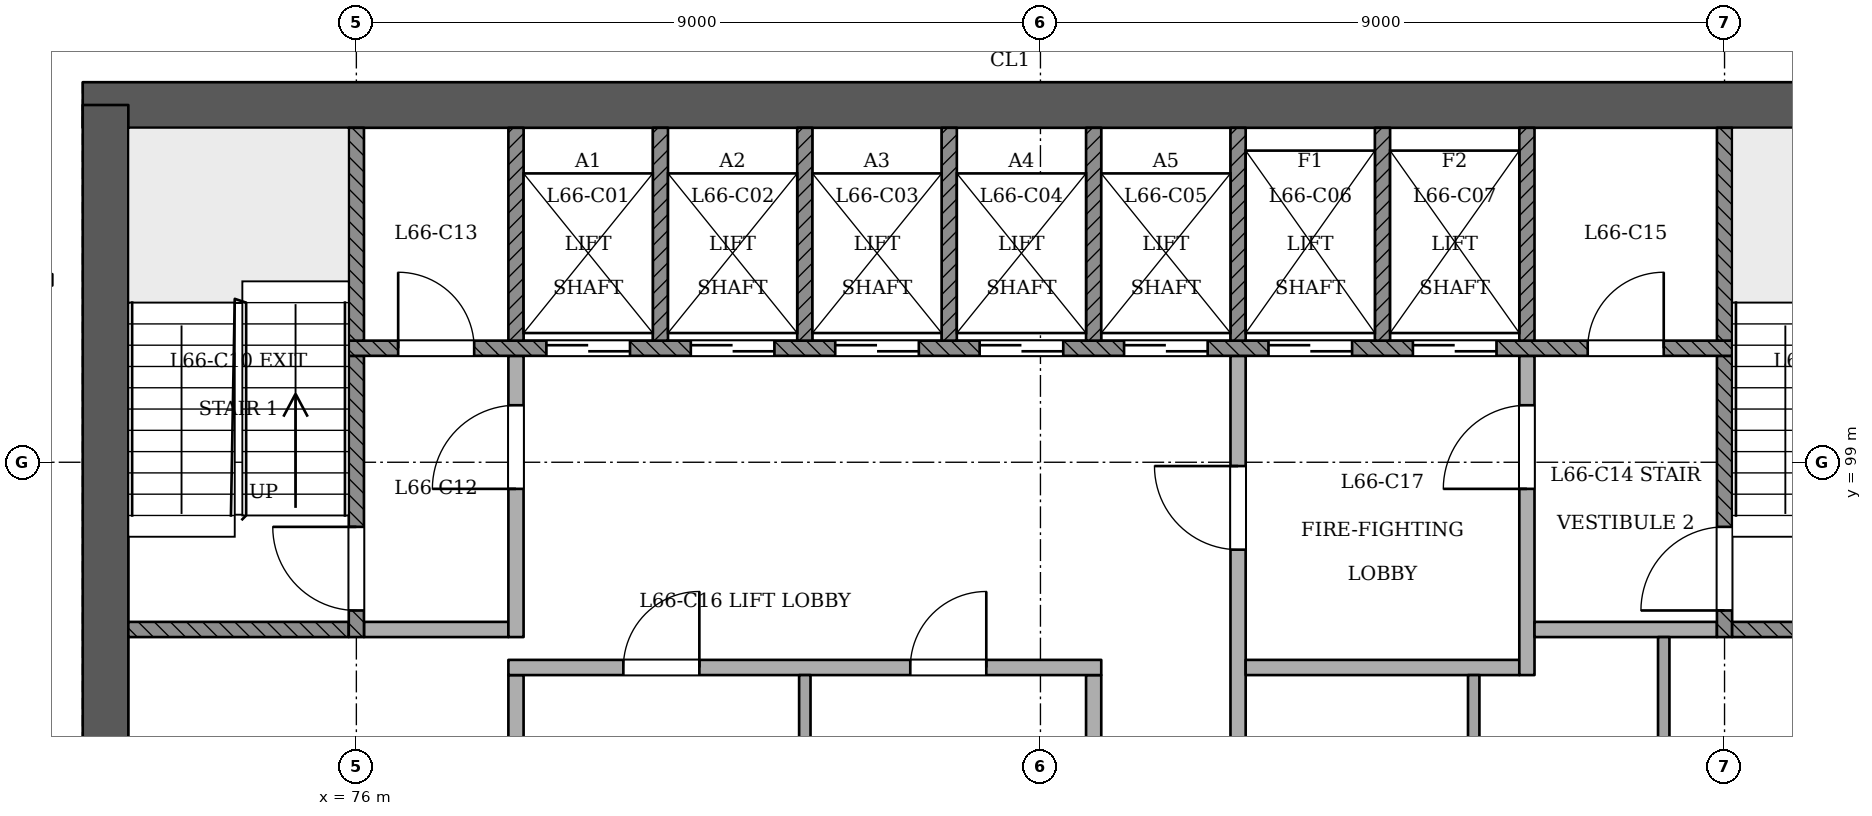
"""IFC4 building model, lengths in metres.
Left out: names, types, materials, properties, quantities, classifications, styles, units other than length and angle.
Written with IfcOpenShell. Run it as: python <this file> out.ifc"""

import sys

from ifc_helpers import new_model, si_unit, direction, frame, frame_2d, origin, place, context, subcontext, project, spatial, rectangle, extrude, element, fill, save


model = new_model("IFC4")
c1 = context("Model", 3, precision=1e-05, world=origin(), true_north=direction((0.0, 1.0)))
c2 = subcontext(c1, "Body", "Model", "MODEL_VIEW")
j1 = project(units=[si_unit("LENGTHUNIT", "METRE"), si_unit("PLANEANGLEUNIT", "RADIAN")], contexts=[c1])
p1 = place(None, origin())
s1 = spatial("IfcSite", under=j1, at=p1, CompositionType="ELEMENT")
p2 = place(p1, origin())
s2 = spatial("IfcBuilding", under=s1, at=p2, CompositionType="ELEMENT")
p3 = place(p2, frame((0.0, 0.0, 257.2)))
s3 = spatial("IfcBuildingStorey", under=s2, at=p3, CompositionType="ELEMENT", Elevation=257.2)
p4 = place(p3, frame((97.3, 103.7, 0.0), z_axis=(0.0, 0.0, 1.0), x_axis=(-1.0, 0.0, 0.0)))
e1 = element("IfcWall", 1, at=p4, inside=s3, PredefinedType="SHEAR", context=c2, shape_type="SweptSolid", body=[
    extrude(rectangle(XDim=24.9, YDim=0.6, at=frame_2d((12.45, 0.0))), origin(), (0.0, 0.0, 1.0), 3.6),
])
p5 = place(p3, frame((72.7, 103.7, 0.0), z_axis=(0.0, 0.0, 1.0), x_axis=(0.0, -1.0, 0.0)))
e2 = element("IfcWall", 2, at=p5, inside=s3, PredefinedType="SHEAR", context=c2, shape_type="SweptSolid", body=[
    extrude(rectangle(XDim=10.9, YDim=0.6, at=frame_2d((5.45, 0.0))), origin(), (0.0, 0.0, 1.0), 3.6),
])
p6 = place(p3, frame((72.0, 101.4, 0.0), z_axis=(0.0, 0.0, 1.0), x_axis=(-1.0, 0.0, 0.0)))
e3 = element("IfcWall", 3, at=p6, inside=s3, PredefinedType="PARTITIONING", context=c2, shape_type="SweptSolid", body=[
    extrude(rectangle(XDim=1.8, YDim=0.15, at=frame_2d((0.9, 0.0))), origin(), (0.0, 0.0, 1.0), 3.2),
])
p7 = place(p6, frame((0.496, 0.0, 0.0)))
e4 = element("IfcOpeningElement", 4, at=p7, cuts=e3, PredefinedType="OPENING", context=c2, shape_type="SweptSolid", body=[
    extrude(rectangle(XDim=1.0, YDim=2.1, at=frame_2d((0.5, 1.05))), frame((0.0, 0.085, 0.0), z_axis=(0.0, -1.0, 0.0), x_axis=(1.0, 0.0, 0.0)), (0.0, 0.0, 1.0), 0.171),
])
p8 = place(p3, frame((78.1, 93.4, 0.0), z_axis=(0.0, 0.0, 1.0), x_axis=(0.0, 1.0, 0.0)))
e5 = element("IfcWall", 5, at=p8, inside=s3, PredefinedType="PARTITIONING", context=c2, shape_type="SweptSolid", body=[
    extrude(rectangle(XDim=2.8, YDim=0.2, at=frame_2d((1.4, 0.0))), origin(), (0.0, 0.0, 1.0), 3.2),
])
p9 = place(p3, frame((81.9, 93.4, 0.0), z_axis=(0.0, 0.0, 1.0), x_axis=(0.0, 1.0, 0.0)))
e6 = element("IfcWall", 6, at=p9, inside=s3, PredefinedType="PARTITIONING", context=c2, shape_type="SweptSolid", body=[
    extrude(rectangle(XDim=2.8, YDim=0.15, at=frame_2d((1.4, 0.0))), origin(), (0.0, 0.0, 1.0), 3.2),
])
p10 = place(p3, frame((85.7, 93.4, 0.0), z_axis=(0.0, 0.0, 1.0), x_axis=(0.0, 1.0, 0.0)))
e7 = element("IfcWall", 7, at=p10, inside=s3, PredefinedType="PARTITIONING", context=c2, shape_type="SweptSolid", body=[
    extrude(rectangle(XDim=2.8, YDim=0.2, at=frame_2d((1.4, 0.0))), origin(), (0.0, 0.0, 1.0), 3.2),
])
p11 = place(p3, frame((87.6, 93.4, 0.0), z_axis=(0.0, 0.0, 1.0), x_axis=(0.0, 1.0, 0.0)))
e8 = element("IfcWall", 8, at=p11, inside=s3, PredefinedType="PARTITIONING", context=c2, shape_type="SweptSolid", body=[
    extrude(rectangle(XDim=7.0, YDim=0.2, at=frame_2d((3.5, 0.0))), origin(), (0.0, 0.0, 1.0), 3.2),
])
p12 = place(p11, frame((4.45, 0.0, 0.0)))
e9 = element("IfcOpeningElement", 9, at=p12, cuts=e8, PredefinedType="OPENING", context=c2, shape_type="SweptSolid", body=[
    extrude(rectangle(XDim=1.1, YDim=2.1, at=frame_2d((0.55, 1.05))), frame((0.0, 0.11, 0.0), z_axis=(0.0, -1.0, 0.0), x_axis=(1.0, 0.0, 0.0)), (0.0, 0.0, 1.0), 0.221),
])
p13 = place(p3, frame((90.7, 93.4, 0.0), z_axis=(0.0, 0.0, 1.0), x_axis=(0.0, 1.0, 0.0)))
e10 = element("IfcWall", 10, at=p13, inside=s3, PredefinedType="PARTITIONING", context=c2, shape_type="SweptSolid", body=[
    extrude(rectangle(XDim=2.8, YDim=0.15, at=frame_2d((1.4, 0.0))), origin(), (0.0, 0.0, 1.0), 3.2),
])
p14 = place(p3, frame((93.2, 93.4, 0.0), z_axis=(0.0, 0.0, 1.0), x_axis=(0.0, 1.0, 0.0)))
e11 = element("IfcWall", 11, at=p14, inside=s3, PredefinedType="PARTITIONING", context=c2, shape_type="SweptSolid", body=[
    extrude(rectangle(XDim=3.3, YDim=0.15, at=frame_2d((1.65, 0.0))), origin(), (0.0, 0.0, 1.0), 3.2),
])
p15 = place(p3, frame((78.0, 96.3, 0.0), z_axis=(0.0, 0.0, 1.0), x_axis=(1.0, 0.0, 0.0)))
e12 = element("IfcWall", 12, at=p15, inside=s3, PredefinedType="PARTITIONING", context=c2, shape_type="SweptSolid", body=[
    extrude(rectangle(XDim=7.8, YDim=0.2, at=frame_2d((3.9, 0.0))), origin(), (0.0, 0.0, 1.0), 3.2),
])
p16 = place(p15, frame((1.512, 0.0, 0.0)))
e13 = element("IfcOpeningElement", 13, at=p16, cuts=e12, PredefinedType="OPENING", context=c2, shape_type="SweptSolid", body=[
    extrude(rectangle(XDim=1.0, YDim=2.1, at=frame_2d((0.5, 1.05))), frame((0.0, 0.11, 0.0), z_axis=(0.0, -1.0, 0.0), x_axis=(1.0, 0.0, 0.0)), (0.0, 0.0, 1.0), 0.221),
])
p17 = place(p15, frame((5.288, 0.0, 0.0)))
e14 = element("IfcOpeningElement", 14, at=p17, cuts=e12, PredefinedType="OPENING", context=c2, shape_type="SweptSolid", body=[
    extrude(rectangle(XDim=1.0, YDim=2.1, at=frame_2d((0.5, 1.05))), frame((0.0, 0.11, 0.0), z_axis=(0.0, -1.0, 0.0), x_axis=(1.0, 0.0, 0.0)), (0.0, 0.0, 1.0), 0.221),
])
p18 = place(p3, frame((87.7, 96.3, 0.0), z_axis=(0.0, 0.0, 1.0), x_axis=(1.0, 0.0, 0.0)))
e15 = element("IfcWall", 15, at=p18, inside=s3, PredefinedType="PARTITIONING", context=c2, shape_type="SweptSolid", body=[
    extrude(rectangle(XDim=3.6, YDim=0.2, at=frame_2d((1.8, 0.0))), origin(), (0.0, 0.0, 1.0), 3.2),
])
p19 = place(p3, frame((91.4, 96.2, 0.0), z_axis=(0.0, 0.0, 1.0), x_axis=(0.0, 1.0, 0.0)))
e16 = element("IfcWall", 16, at=p19, inside=s3, PredefinedType="PARTITIONING", context=c2, shape_type="SweptSolid", body=[
    extrude(rectangle(XDim=4.2, YDim=0.2, at=frame_2d((2.1, 0.0))), origin(), (0.0, 0.0, 1.0), 3.2),
])
p20 = place(p19, frame((2.45, 0.0, 0.0)))
e17 = element("IfcOpeningElement", 17, at=p20, cuts=e16, PredefinedType="OPENING", context=c2, shape_type="SweptSolid", body=[
    extrude(rectangle(XDim=1.1, YDim=2.1, at=frame_2d((0.55, 1.05))), frame((0.0, 0.11, 0.0), z_axis=(0.0, -1.0, 0.0), x_axis=(1.0, 0.0, 0.0)), (0.0, 0.0, 1.0), 0.221),
])
p21 = place(p3, frame((73.0, 96.8, 0.0), z_axis=(0.0, 0.0, 1.0), x_axis=(1.0, 0.0, 0.0)))
e18 = element("IfcWall", 18, at=p21, inside=s3, PredefinedType="SOLIDWALL", context=c2, shape_type="SweptSolid", body=[
    extrude(rectangle(XDim=2.9, YDim=0.2, at=frame_2d((1.45, 0.0))), origin(), (0.0, 0.0, 1.0), 3.2),
])
p22 = place(p3, frame((76.0, 96.7, 0.0), z_axis=(0.0, 0.0, 1.0), x_axis=(0.0, 1.0, 0.0)))
e19 = element("IfcWall", 19, at=p22, inside=s3, PredefinedType="SOLIDWALL", context=c2, shape_type="SweptSolid", body=[
    extrude(rectangle(XDim=3.7, YDim=0.2, at=frame_2d((1.85, 0.0))), origin(), (0.0, 0.0, 1.0), 3.2),
])
p23 = place(p22, frame((0.35, 0.0, 0.0)))
e20 = element("IfcOpeningElement", 20, at=p23, cuts=e19, PredefinedType="OPENING", context=c2, shape_type="SweptSolid", body=[
    extrude(rectangle(XDim=1.1, YDim=2.1, at=frame_2d((0.55, 1.05))), frame((0.0, 0.11, 0.0), z_axis=(0.0, -1.0, 0.0), x_axis=(1.0, 0.0, 0.0)), (0.0, 0.0, 1.0), 0.221),
])
p24 = place(p3, frame((76.1, 96.8, 0.0), z_axis=(0.0, 0.0, 1.0), x_axis=(1.0, 0.0, 0.0)))
e21 = element("IfcWall", 21, at=p24, inside=s3, PredefinedType="PARTITIONING", context=c2, shape_type="SweptSolid", body=[
    extrude(rectangle(XDim=1.9, YDim=0.2, at=frame_2d((0.95, 0.0))), origin(), (0.0, 0.0, 1.0), 3.2),
])
p25 = place(p3, frame((78.1, 96.7, 0.0), z_axis=(0.0, 0.0, 1.0), x_axis=(0.0, 1.0, 0.0)))
e22 = element("IfcWall", 22, at=p25, inside=s3, PredefinedType="PARTITIONING", context=c2, shape_type="SweptSolid", body=[
    extrude(rectangle(XDim=3.7, YDim=0.2, at=frame_2d((1.85, 0.0))), origin(), (0.0, 0.0, 1.0), 3.2),
])
p26 = place(p25, frame((1.95, 0.0, 0.0)))
e23 = element("IfcOpeningElement", 23, at=p26, cuts=e22, PredefinedType="OPENING", context=c2, shape_type="SweptSolid", body=[
    extrude(rectangle(XDim=1.1, YDim=2.1, at=frame_2d((0.55, 1.05))), frame((0.0, 0.11, 0.0), z_axis=(0.0, -1.0, 0.0), x_axis=(1.0, 0.0, 0.0)), (0.0, 0.0, 1.0), 0.221),
])
p27 = place(p3, frame((91.5, 96.8, 0.0), z_axis=(0.0, 0.0, 1.0), x_axis=(1.0, 0.0, 0.0)))
e24 = element("IfcWall", 24, at=p27, inside=s3, PredefinedType="PARTITIONING", context=c2, shape_type="SweptSolid", body=[
    extrude(rectangle(XDim=2.4, YDim=0.2, at=frame_2d((1.2, 0.0))), origin(), (0.0, 0.0, 1.0), 3.2),
])
p28 = place(p3, frame((94.0, 96.7, 0.0), z_axis=(0.0, 0.0, 1.0), x_axis=(0.0, 1.0, 0.0)))
e25 = element("IfcWall", 25, at=p28, inside=s3, PredefinedType="SOLIDWALL", context=c2, shape_type="SweptSolid", body=[
    extrude(rectangle(XDim=3.7, YDim=0.2, at=frame_2d((1.85, 0.0))), origin(), (0.0, 0.0, 1.0), 3.2),
])
p29 = place(p28, frame((0.35, 0.0, 0.0)))
e26 = element("IfcOpeningElement", 26, at=p29, cuts=e25, PredefinedType="OPENING", context=c2, shape_type="SweptSolid", body=[
    extrude(rectangle(XDim=1.1, YDim=2.1, at=frame_2d((0.55, 1.05))), frame((0.0, 0.11, 0.0), z_axis=(0.0, -1.0, 0.0), x_axis=(1.0, 0.0, 0.0)), (0.0, 0.0, 1.0), 0.221),
])
p30 = place(p3, frame((94.1, 96.8, 0.0), z_axis=(0.0, 0.0, 1.0), x_axis=(1.0, 0.0, 0.0)))
e27 = element("IfcWall", 27, at=p30, inside=s3, PredefinedType="SOLIDWALL", context=c2, shape_type="SweptSolid", body=[
    extrude(rectangle(XDim=2.9, YDim=0.2, at=frame_2d((1.45, 0.0))), origin(), (0.0, 0.0, 1.0), 3.2),
])
p31 = place(p3, frame((75.9, 100.5, 0.0), z_axis=(0.0, 0.0, 1.0), x_axis=(1.0, 0.0, 0.0)))
e28 = element("IfcWall", 28, at=p31, inside=s3, PredefinedType="SOLIDWALL", context=c2, shape_type="SweptSolid", body=[
    extrude(rectangle(XDim=18.2, YDim=0.2, at=frame_2d((9.1, 0.0))), origin(), (0.0, 0.0, 1.0), 3.2),
])
p32 = place(p31, frame((2.6, 0.0, 0.0)))
e29 = element("IfcOpeningElement", 29, at=p32, cuts=e28, PredefinedType="OPENING", context=c2, shape_type="SweptSolid", body=[
    extrude(rectangle(XDim=1.1, YDim=2.1, at=frame_2d((0.55, 1.05))), frame((0.0, 0.11, 0.0), z_axis=(0.0, -1.0, 0.0), x_axis=(1.0, 0.0, 0.0)), (0.0, 0.0, 1.0), 0.221),
])
p33 = place(p31, frame((4.5, 0.0, 0.0)))
e30 = element("IfcOpeningElement", 30, at=p33, cuts=e28, PredefinedType="OPENING", context=c2, shape_type="SweptSolid", body=[
    extrude(rectangle(XDim=1.1, YDim=2.1, at=frame_2d((0.55, 1.05))), frame((0.0, 0.11, 0.0), z_axis=(0.0, -1.0, 0.0), x_axis=(1.0, 0.0, 0.0)), (0.0, 0.0, 1.0), 0.221),
])
p34 = place(p31, frame((6.4, 0.0, 0.0)))
e31 = element("IfcOpeningElement", 31, at=p34, cuts=e28, PredefinedType="OPENING", context=c2, shape_type="SweptSolid", body=[
    extrude(rectangle(XDim=1.1, YDim=2.1, at=frame_2d((0.55, 1.05))), frame((0.0, 0.11, 0.0), z_axis=(0.0, -1.0, 0.0), x_axis=(1.0, 0.0, 0.0)), (0.0, 0.0, 1.0), 0.221),
])
p35 = place(p31, frame((8.3, 0.0, 0.0)))
e32 = element("IfcOpeningElement", 32, at=p35, cuts=e28, PredefinedType="OPENING", context=c2, shape_type="SweptSolid", body=[
    extrude(rectangle(XDim=1.1, YDim=2.1, at=frame_2d((0.55, 1.05))), frame((0.0, 0.11, 0.0), z_axis=(0.0, -1.0, 0.0), x_axis=(1.0, 0.0, 0.0)), (0.0, 0.0, 1.0), 0.221),
])
p36 = place(p31, frame((10.2, 0.0, 0.0)))
e33 = element("IfcOpeningElement", 33, at=p36, cuts=e28, PredefinedType="OPENING", context=c2, shape_type="SweptSolid", body=[
    extrude(rectangle(XDim=1.1, YDim=2.1, at=frame_2d((0.55, 1.05))), frame((0.0, 0.11, 0.0), z_axis=(0.0, -1.0, 0.0), x_axis=(1.0, 0.0, 0.0)), (0.0, 0.0, 1.0), 0.221),
])
p37 = place(p31, frame((12.1, 0.0, 0.0)))
e34 = element("IfcOpeningElement", 34, at=p37, cuts=e28, PredefinedType="OPENING", context=c2, shape_type="SweptSolid", body=[
    extrude(rectangle(XDim=1.1, YDim=2.1, at=frame_2d((0.55, 1.05))), frame((0.0, 0.11, 0.0), z_axis=(0.0, -1.0, 0.0), x_axis=(1.0, 0.0, 0.0)), (0.0, 0.0, 1.0), 0.221),
])
p38 = place(p31, frame((14.0, 0.0, 0.0)))
e35 = element("IfcOpeningElement", 35, at=p38, cuts=e28, PredefinedType="OPENING", context=c2, shape_type="SweptSolid", body=[
    extrude(rectangle(XDim=1.1, YDim=2.1, at=frame_2d((0.55, 1.05))), frame((0.0, 0.11, 0.0), z_axis=(0.0, -1.0, 0.0), x_axis=(1.0, 0.0, 0.0)), (0.0, 0.0, 1.0), 0.221),
])
p39 = place(p31, frame((0.65, 0.0, 0.0)))
e36 = element("IfcOpeningElement", 36, at=p39, cuts=e28, PredefinedType="OPENING", context=c2, shape_type="SweptSolid", body=[
    extrude(rectangle(XDim=1.0, YDim=2.1, at=frame_2d((0.5, 1.05))), frame((0.0, 0.11, 0.0), z_axis=(0.0, -1.0, 0.0), x_axis=(1.0, 0.0, 0.0)), (0.0, 0.0, 1.0), 0.221),
])
p40 = place(p31, frame((16.3, 0.0, 0.0)))
e37 = element("IfcOpeningElement", 37, at=p40, cuts=e28, PredefinedType="OPENING", context=c2, shape_type="SweptSolid", body=[
    extrude(rectangle(XDim=1.0, YDim=2.1, at=frame_2d((0.5, 1.05))), frame((0.0, 0.11, 0.0), z_axis=(0.0, -1.0, 0.0), x_axis=(1.0, 0.0, 0.0)), (0.0, 0.0, 1.0), 0.221),
])
for number, where, z_axis, x_axis in (
    (38, (76.0, 100.6, 0.0), (0.0, 0.0, 1.0), (0.0, 1.0, 0.0)),
    (39, (78.1, 100.6, 0.0), (0.0, 0.0, 1.0), (0.0, 1.0, 0.0)),
    (40, (80.0, 100.6, 0.0), (0.0, 0.0, 1.0), (0.0, 1.0, 0.0)),
    (41, (81.9, 100.6, 0.0), (0.0, 0.0, 1.0), (0.0, 1.0, 0.0)),
    (42, (83.8, 100.6, 0.0), (0.0, 0.0, 1.0), (0.0, 1.0, 0.0)),
    (43, (85.7, 100.6, 0.0), (0.0, 0.0, 1.0), (0.0, 1.0, 0.0)),
    (44, (87.6, 100.6, 0.0), (0.0, 0.0, 1.0), (0.0, 1.0, 0.0)),
    (45, (89.5, 100.6, 0.0), (0.0, 0.0, 1.0), (0.0, 1.0, 0.0)),
    (46, (91.4, 100.6, 0.0), (0.0, 0.0, 1.0), (0.0, 1.0, 0.0)),
    (47, (94.0, 100.6, 0.0), (0.0, 0.0, 1.0), (0.0, 1.0, 0.0)),
):
    element("IfcWall", number, at=place(p3, frame(where, z_axis=z_axis, x_axis=x_axis)), inside=s3, PredefinedType="SOLIDWALL", context=c2, shape_type="SweptSolid", body=[
        extrude(rectangle(XDim=2.8, YDim=0.2, at=frame_2d((1.4, 0.0))), origin(), (0.0, 0.0, 1.0), 3.2),
    ])
p41 = place(p32, origin())
e48 = element("IfcDoor", 48, at=p41, inside=s3, OperationType="SLIDING_TO_RIGHT", PredefinedType="NOTDEFINED", context=c2, shape_type="SweptSolid", body=[
    extrude(rectangle(XDim=1.1, YDim=2.1, at=frame_2d((0.55, 1.05))), frame((0.0, 0.025, 0.0), z_axis=(0.0, -1.0, 0.0), x_axis=(1.0, 0.0, 0.0)), (0.0, 0.0, 1.0), 0.05),
])
fill(e29, e48)
p42 = place(p33, origin())
e49 = element("IfcDoor", 49, at=p42, inside=s3, OperationType="SLIDING_TO_LEFT", PredefinedType="NOTDEFINED", context=c2, shape_type="SweptSolid", body=[
    extrude(rectangle(XDim=1.1, YDim=2.1, at=frame_2d((0.55, 1.05))), frame((0.0, 0.025, 0.0), z_axis=(0.0, -1.0, 0.0), x_axis=(1.0, 0.0, 0.0)), (0.0, 0.0, 1.0), 0.05),
])
fill(e30, e49)
p43 = place(p34, origin())
e50 = element("IfcDoor", 50, at=p43, inside=s3, OperationType="SLIDING_TO_RIGHT", PredefinedType="NOTDEFINED", context=c2, shape_type="SweptSolid", body=[
    extrude(rectangle(XDim=1.1, YDim=2.1, at=frame_2d((0.55, 1.05))), frame((0.0, 0.025, 0.0), z_axis=(0.0, -1.0, 0.0), x_axis=(1.0, 0.0, 0.0)), (0.0, 0.0, 1.0), 0.05),
])
fill(e31, e50)
p44 = place(p35, origin())
e51 = element("IfcDoor", 51, at=p44, inside=s3, OperationType="SLIDING_TO_LEFT", PredefinedType="NOTDEFINED", context=c2, shape_type="SweptSolid", body=[
    extrude(rectangle(XDim=1.1, YDim=2.1, at=frame_2d((0.55, 1.05))), frame((0.0, 0.025, 0.0), z_axis=(0.0, -1.0, 0.0), x_axis=(1.0, 0.0, 0.0)), (0.0, 0.0, 1.0), 0.05),
])
fill(e32, e51)
p45 = place(p36, origin())
e52 = element("IfcDoor", 52, at=p45, inside=s3, OperationType="SLIDING_TO_RIGHT", PredefinedType="NOTDEFINED", context=c2, shape_type="SweptSolid", body=[
    extrude(rectangle(XDim=1.1, YDim=2.1, at=frame_2d((0.55, 1.05))), frame((0.0, 0.025, 0.0), z_axis=(0.0, -1.0, 0.0), x_axis=(1.0, 0.0, 0.0)), (0.0, 0.0, 1.0), 0.05),
])
fill(e33, e52)
p46 = place(p37, origin())
e53 = element("IfcDoor", 53, at=p46, inside=s3, OperationType="SLIDING_TO_RIGHT", PredefinedType="NOTDEFINED", context=c2, shape_type="SweptSolid", body=[
    extrude(rectangle(XDim=1.1, YDim=2.1, at=frame_2d((0.55, 1.05))), frame((0.0, 0.025, 0.0), z_axis=(0.0, -1.0, 0.0), x_axis=(1.0, 0.0, 0.0)), (0.0, 0.0, 1.0), 0.05),
])
fill(e34, e53)
p47 = place(p38, origin())
e54 = element("IfcDoor", 54, at=p47, inside=s3, OperationType="SLIDING_TO_LEFT", PredefinedType="NOTDEFINED", context=c2, shape_type="SweptSolid", body=[
    extrude(rectangle(XDim=1.1, YDim=2.1, at=frame_2d((0.55, 1.05))), frame((0.0, 0.025, 0.0), z_axis=(0.0, -1.0, 0.0), x_axis=(1.0, 0.0, 0.0)), (0.0, 0.0, 1.0), 0.05),
])
fill(e35, e54)
p48 = place(p23, origin())
e55 = element("IfcDoor", 55, at=p48, inside=s3, OperationType="SINGLE_SWING_RIGHT", PredefinedType="NOTDEFINED", context=c2, shape_type="SweptSolid", body=[
    extrude(rectangle(XDim=1.1, YDim=2.1, at=frame_2d((0.55, 1.05))), frame((0.0, 0.025, 0.0), z_axis=(0.0, -1.0, 0.0), x_axis=(1.0, 0.0, 0.0)), (0.0, 0.0, 1.0), 0.05),
])
fill(e20, e55)
p49 = place(p29, origin())
e56 = element("IfcDoor", 56, at=p49, inside=s3, OperationType="SINGLE_SWING_LEFT", PredefinedType="NOTDEFINED", context=c2, shape_type="SweptSolid", body=[
    extrude(rectangle(XDim=1.1, YDim=2.1, at=frame_2d((0.55, 1.05))), frame((0.0, 0.025, 0.0), z_axis=(0.0, -1.0, 0.0), x_axis=(1.0, 0.0, 0.0)), (0.0, 0.0, 1.0), 0.05),
])
fill(e26, e56)
p50 = place(p26, origin())
e57 = element("IfcDoor", 57, at=p50, inside=s3, OperationType="SINGLE_SWING_LEFT", PredefinedType="NOTDEFINED", context=c2, shape_type="SweptSolid", body=[
    extrude(rectangle(XDim=1.1, YDim=2.1, at=frame_2d((0.55, 1.05))), frame((0.0, 0.025, 0.0), z_axis=(0.0, -1.0, 0.0), x_axis=(1.0, 0.0, 0.0)), (0.0, 0.0, 1.0), 0.05),
])
fill(e23, e57)
p51 = place(p12, origin())
e58 = element("IfcDoor", 58, at=p51, inside=s3, OperationType="SINGLE_SWING_RIGHT", PredefinedType="NOTDEFINED", context=c2, shape_type="SweptSolid", body=[
    extrude(rectangle(XDim=1.1, YDim=2.1, at=frame_2d((0.55, 1.05))), frame((0.0, 0.025, 0.0), z_axis=(0.0, -1.0, 0.0), x_axis=(1.0, 0.0, 0.0)), (0.0, 0.0, 1.0), 0.05),
])
fill(e9, e58)
p52 = place(p20, origin())
e59 = element("IfcDoor", 59, at=p52, inside=s3, OperationType="SINGLE_SWING_LEFT", PredefinedType="NOTDEFINED", context=c2, shape_type="SweptSolid", body=[
    extrude(rectangle(XDim=1.1, YDim=2.1, at=frame_2d((0.55, 1.05))), frame((0.0, 0.025, 0.0), z_axis=(0.0, -1.0, 0.0), x_axis=(1.0, 0.0, 0.0)), (0.0, 0.0, 1.0), 0.05),
])
fill(e17, e59)
p53 = place(p39, origin())
e60 = element("IfcDoor", 60, at=p53, inside=s3, OperationType="SINGLE_SWING_LEFT", PredefinedType="NOTDEFINED", context=c2, shape_type="SweptSolid", body=[
    extrude(rectangle(XDim=1.0, YDim=2.1, at=frame_2d((0.5, 1.05))), frame((0.0, 0.025, 0.0), z_axis=(0.0, -1.0, 0.0), x_axis=(1.0, 0.0, 0.0)), (0.0, 0.0, 1.0), 0.05),
])
fill(e36, e60)
p54 = place(p40, origin())
e61 = element("IfcDoor", 61, at=p54, inside=s3, OperationType="SINGLE_SWING_RIGHT", PredefinedType="NOTDEFINED", context=c2, shape_type="SweptSolid", body=[
    extrude(rectangle(XDim=1.0, YDim=2.1, at=frame_2d((0.5, 1.05))), frame((0.0, 0.025, 0.0), z_axis=(0.0, -1.0, 0.0), x_axis=(1.0, 0.0, 0.0)), (0.0, 0.0, 1.0), 0.05),
])
fill(e37, e61)
p55 = place(p16, origin())
e62 = element("IfcDoor", 62, at=p55, inside=s3, OperationType="SINGLE_SWING_RIGHT", PredefinedType="NOTDEFINED", context=c2, shape_type="SweptSolid", body=[
    extrude(rectangle(XDim=1.0, YDim=2.1, at=frame_2d((0.5, 1.05))), frame((0.0, 0.025, 0.0), z_axis=(0.0, -1.0, 0.0), x_axis=(1.0, 0.0, 0.0)), (0.0, 0.0, 1.0), 0.05),
])
fill(e13, e62)
p56 = place(p17, origin())
e63 = element("IfcDoor", 63, at=p56, inside=s3, OperationType="SINGLE_SWING_RIGHT", PredefinedType="NOTDEFINED", context=c2, shape_type="SweptSolid", body=[
    extrude(rectangle(XDim=1.0, YDim=2.1, at=frame_2d((0.5, 1.05))), frame((0.0, 0.025, 0.0), z_axis=(0.0, -1.0, 0.0), x_axis=(1.0, 0.0, 0.0)), (0.0, 0.0, 1.0), 0.05),
])
fill(e14, e63)
save(model, sys.argv[1])
